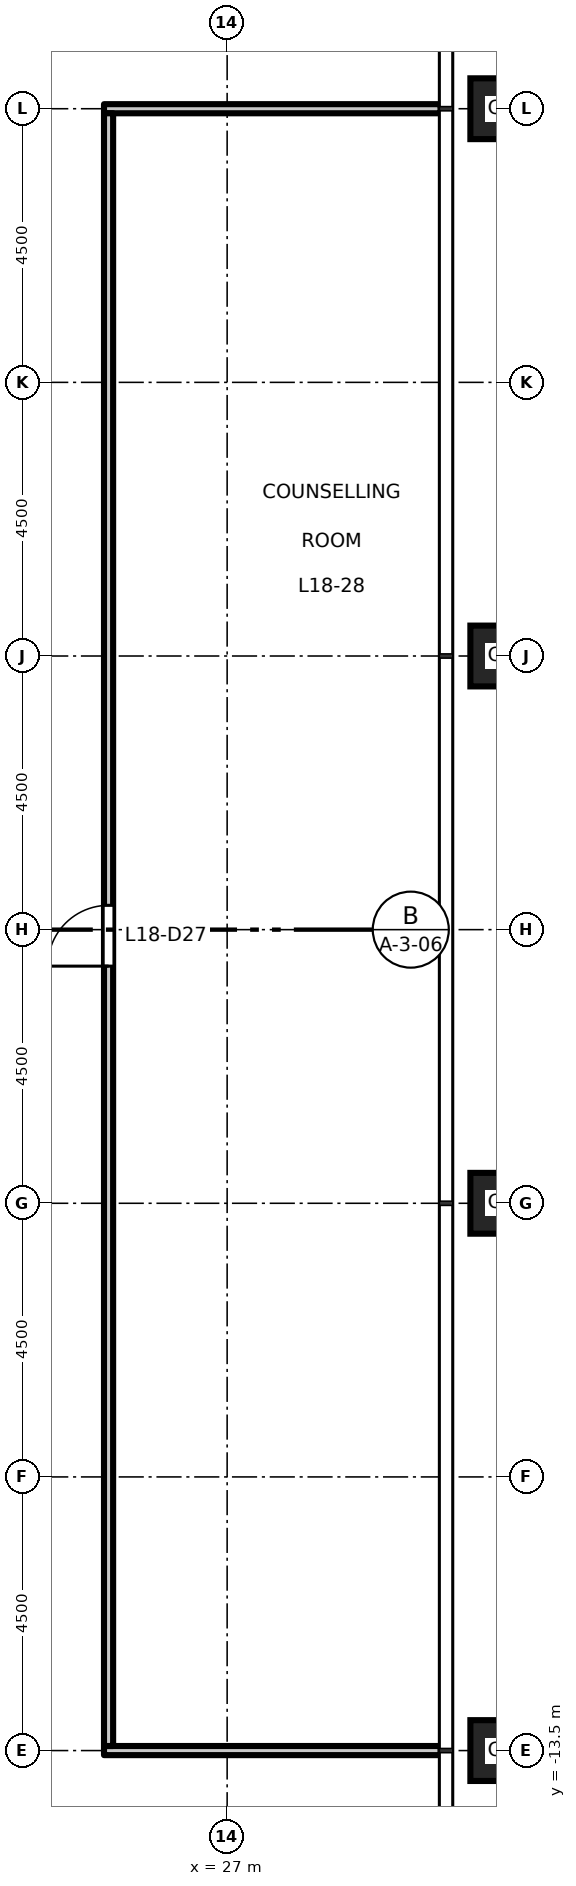
"""IFC4 building model, lengths in metres.
Left out: names, types, materials, properties, quantities, classifications, styles, units other than length and angle.
Written with IfcOpenShell. Run it as: python <this file> out.ifc"""

import sys

from ifc_helpers import new_model, si_unit, direction, frame, frame_2d, origin, origin_2d, place, context, subcontext, project, spatial, rectangle, hollow_rectangle, extrude, element, fill, save


model = new_model("IFC4")
c1 = context("Model", 3, precision=1e-05, world=origin(), true_north=direction((0.0, 1.0)))
c2 = subcontext(c1, "Body", "Model", "MODEL_VIEW")
j1 = project(units=[si_unit("LENGTHUNIT", "METRE"), si_unit("PLANEANGLEUNIT", "RADIAN")], contexts=[c1])
p1 = place(None, origin())
s1 = spatial("IfcSite", under=j1, at=p1, CompositionType="ELEMENT")
p2 = place(p1, origin())
s2 = spatial("IfcBuilding", under=s1, at=p2, CompositionType="ELEMENT")
p3 = place(p2, frame((0.0, 0.0, 85.2)))
s3 = spatial("IfcBuildingStorey", under=s2, at=p3, CompositionType="ELEMENT", Elevation=85.2)
for number, where, z_axis, x_axis in (
    (1, (31.5, -13.5, 0.0), (0.0, 0.0, 1.0), (1.0, 0.0, 0.0)),
    (2, (31.5, -4.5, 0.0), (0.0, 0.0, 1.0), (1.0, 0.0, 0.0)),
    (3, (31.5, 4.5, 0.0), (0.0, 0.0, 1.0), (1.0, 0.0, 0.0)),
    (4, (31.5, 13.5, 0.0), (0.0, 0.0, 1.0), (1.0, 0.0, 0.0)),
):
    element("IfcColumn", number, at=place(p3, frame(where, z_axis=z_axis, x_axis=x_axis)), inside=s3, PredefinedType="COLUMN", context=c2, shape_type="SweptSolid", body=[
        extrude(hollow_rectangle(XDim=1.0, YDim=1.0, WallThickness=0.06, at=origin_2d()), origin(), (0.0, 0.0, 1.0), 4.5),
    ])
for number, where, z_axis, x_axis in (
    (5, (24.975, -13.5, 0.0), (0.0, 0.0, 1.0), (1.0, 0.0, 0.0)),
    (6, (24.975, 13.5, 0.0), (0.0, 0.0, 1.0), (1.0, 0.0, 0.0)),
):
    element("IfcWall", number, at=place(p3, frame(where, z_axis=z_axis, x_axis=x_axis)), inside=s3, PredefinedType="PARTITIONING", context=c2, shape_type="SweptSolid", body=[
        extrude(rectangle(XDim=5.535, YDim=0.15, at=frame_2d((2.768, 0.0))), origin(), (0.0, 0.0, 1.0), 3.35),
    ])
p4 = place(p3, frame((25.05, -13.425, 0.0), z_axis=(0.0, 0.0, 1.0), x_axis=(0.0, 1.0, 0.0)))
e7 = element("IfcWall", 7, at=p4, inside=s3, PredefinedType="PARTITIONING", context=c2, shape_type="SweptSolid", body=[
    extrude(rectangle(XDim=26.85, YDim=0.15, at=frame_2d((13.425, 0.0))), origin(), (0.0, 0.0, 1.0), 4.35),
])
p5 = place(p4, frame((12.825, 0.0, 0.0)))
e8 = element("IfcOpeningElement", 8, at=p5, cuts=e7, PredefinedType="OPENING", context=c2, shape_type="SweptSolid", body=[
    extrude(rectangle(XDim=1.0, YDim=2.1, at=frame_2d((0.5, 1.05))), frame((0.0, 0.085, 0.0), z_axis=(0.0, -1.0, 0.0), x_axis=(1.0, 0.0, 0.0)), (0.0, 0.0, 1.0), 0.17),
])
p6 = place(p5, origin())
e9 = element("IfcDoor", 9, at=p6, inside=s3, OperationType="SINGLE_SWING_LEFT", PredefinedType="DOOR", context=c2, shape_type="SweptSolid", body=[
    extrude(rectangle(XDim=1.0, YDim=2.1, at=frame_2d((0.5, 1.05))), frame((0.0, 0.025, 0.0), z_axis=(0.0, -1.0, 0.0), x_axis=(1.0, 0.0, 0.0)), (0.0, 0.0, 1.0), 0.05),
])
fill(e8, e9)
save(model, sys.argv[1])
